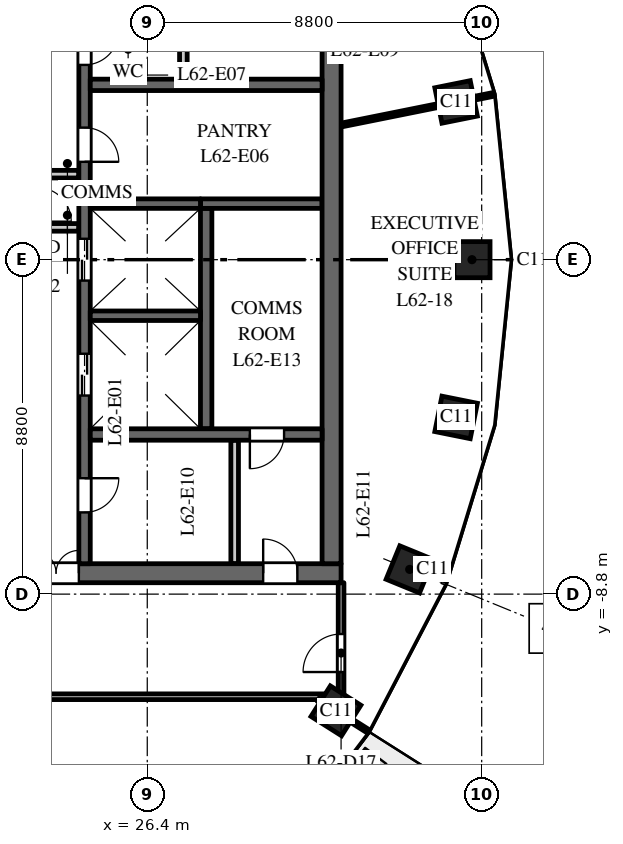
"""IFC4 building model, lengths in metres.
Left out: names, types, materials, properties, quantities, classifications, styles, units other than length and angle.
Written with IfcOpenShell. Run it as: python <this file> out.ifc"""

import sys

from ifc_helpers import new_model, si_unit, direction, frame, frame_2d, origin, origin_2d, place, context, subcontext, project, spatial, rectangle, extrude, element, fill, save


model = new_model("IFC4")
c1 = context("Model", 3, precision=1e-05, world=origin(), true_north=direction((0.0, 1.0)))
c2 = subcontext(c1, "Body", "Model", "MODEL_VIEW")
j1 = project(units=[si_unit("LENGTHUNIT", "METRE"), si_unit("PLANEANGLEUNIT", "RADIAN")], contexts=[c1])
p1 = place(None, origin())
s1 = spatial("IfcSite", under=j1, at=p1, CompositionType="ELEMENT")
p2 = place(p1, origin())
s2 = spatial("IfcBuilding", under=s1, at=p2, CompositionType="ELEMENT")
p3 = place(p2, frame((0.0, 0.0, 291.0)))
s3 = spatial("IfcBuildingStorey", under=s2, at=p3, CompositionType="ELEMENT", Elevation=291.0)
for number, where, z_axis, x_axis in (
    (1, (34.945, 0.0, 0.0), (0.0, 0.0, 1.0), (0.0, 1.0, 0.0)),
    (2, (34.527, 4.151, 0.0), (0.0, 0.0, 1.0), (-0.197, 0.98, 0.0)),
    (3, (31.365, -11.871, 0.0), (0.0, 0.0, 1.0), (0.535, 0.845, 0.0)),
    (4, (33.305, -8.149, 0.0), (0.0, 0.0, 1.0), (0.379, 0.925, 0.0)),
    (5, (34.527, -4.151, 0.0), (0.0, 0.0, 1.0), (0.197, 0.98, 0.0)),
):
    element("IfcColumn", number, at=place(p3, frame(where, z_axis=z_axis, x_axis=x_axis)), inside=s3, PredefinedType="COLUMN", context=c2, shape_type="SweptSolid", body=[
        extrude(rectangle(XDim=0.95, YDim=0.95, at=origin_2d()), origin(), (0.0, 0.0, 1.0), 4.0),
    ])
p4 = place(p3, frame((16.5, -8.25, 0.0), z_axis=(0.0, 0.0, 1.0), x_axis=(1.0, 0.0, 0.0)))
e6 = element("IfcWall", 6, at=p4, inside=s3, PredefinedType="SHEAR", context=c2, shape_type="SweptSolid", body=[
    extrude(rectangle(XDim=15.0, YDim=0.5, at=frame_2d((7.5, 0.0))), origin(), (0.0, 0.0, 1.0), 3.7),
])
p5 = place(p4, frame((6.9, 0.0, 0.0)))
e7 = element("IfcOpeningElement", 7, at=p5, cuts=e6, PredefinedType="OPENING", context=c2, shape_type="SweptSolid", body=[
    extrude(rectangle(XDim=1.2, YDim=2.1, at=frame_2d((0.6, 1.05))), frame((0.0, 0.26, 0.0), z_axis=(0.0, -1.0, 0.0), x_axis=(1.0, 0.0, 0.0)), (0.0, 0.0, 1.0), 0.52),
])
p6 = place(p4, frame((12.95, 0.0, 0.0)))
e8 = element("IfcOpeningElement", 8, at=p6, cuts=e6, PredefinedType="OPENING", context=c2, shape_type="SweptSolid", body=[
    extrude(rectangle(XDim=0.9, YDim=2.1, at=frame_2d((0.45, 1.05))), frame((0.0, 0.26, 0.0), z_axis=(0.0, -1.0, 0.0), x_axis=(1.0, 0.0, 0.0)), (0.0, 0.0, 1.0), 0.52),
])
p7 = place(p3, frame((27.95, -4.45, 0.0), z_axis=(0.0, 0.0, 1.0), x_axis=(0.0, 1.0, 0.0)))
e9 = element("IfcWall", 9, at=p7, inside=s3, PredefinedType="SHEAR", context=c2, shape_type="SweptSolid", body=[
    extrude(rectangle(XDim=5.8, YDim=0.3, at=frame_2d((2.9, 0.0))), origin(), (0.0, 0.0, 1.0), 3.7),
])
p8 = place(p3, frame((27.8, 1.475, 0.0), z_axis=(0.0, 0.0, 1.0), x_axis=(1.0, 0.0, 0.0)))
e10 = element("IfcWall", 10, at=p8, inside=s3, PredefinedType="SHEAR", context=c2, shape_type="SweptSolid", body=[
    extrude(rectangle(XDim=3.2, YDim=0.25, at=frame_2d((1.6, 0.0))), origin(), (0.0, 0.0, 1.0), 3.7),
])
p9 = place(p3, frame((24.75, -8.0, 0.0), z_axis=(0.0, 0.0, 1.0), x_axis=(0.0, 1.0, 0.0)))
e11 = element("IfcWall", 11, at=p9, inside=s3, PredefinedType="SHEAR", context=c2, shape_type="SweptSolid", body=[
    extrude(rectangle(XDim=16.0, YDim=0.3, at=frame_2d((8.0, 0.0))), origin(), (0.0, 0.0, 1.0), 3.7),
])
p10 = place(p9, frame((4.425, 0.0, 0.0)))
e12 = element("IfcOpeningElement", 12, at=p10, cuts=e11, PredefinedType="OPENING", context=c2, shape_type="SweptSolid", body=[
    extrude(rectangle(XDim=1.1, YDim=2.1, at=frame_2d((0.55, 1.05))), frame((0.0, 0.16, 0.0), z_axis=(0.0, -1.0, 0.0), x_axis=(1.0, 0.0, 0.0)), (0.0, 0.0, 1.0), 0.32),
])
p11 = place(p9, frame((7.45, 0.0, 0.0)))
e13 = element("IfcOpeningElement", 13, at=p11, cuts=e11, PredefinedType="OPENING", context=c2, shape_type="SweptSolid", body=[
    extrude(rectangle(XDim=1.1, YDim=2.1, at=frame_2d((0.55, 1.05))), frame((0.0, 0.16, 0.0), z_axis=(0.0, -1.0, 0.0), x_axis=(1.0, 0.0, 0.0)), (0.0, 0.0, 1.0), 0.32),
])
p12 = place(p9, frame((10.575, 0.0, 0.0)))
e14 = element("IfcOpeningElement", 14, at=p12, cuts=e11, PredefinedType="OPENING", context=c2, shape_type="SweptSolid", body=[
    extrude(rectangle(XDim=0.9, YDim=2.1, at=frame_2d((0.45, 1.05))), frame((0.0, 0.16, 0.0), z_axis=(0.0, -1.0, 0.0), x_axis=(1.0, 0.0, 0.0)), (0.0, 0.0, 1.0), 0.32),
])
p13 = place(p9, frame((13.125, 0.0, 0.0)))
e15 = element("IfcOpeningElement", 15, at=p13, cuts=e11, PredefinedType="OPENING", context=c2, shape_type="SweptSolid", body=[
    extrude(rectangle(XDim=0.9, YDim=2.1, at=frame_2d((0.45, 1.05))), frame((0.0, 0.16, 0.0), z_axis=(0.0, -1.0, 0.0), x_axis=(1.0, 0.0, 0.0)), (0.0, 0.0, 1.0), 0.32),
])
p14 = place(p9, frame((14.75, 0.0, 0.0)))
e16 = element("IfcOpeningElement", 16, at=p14, cuts=e11, PredefinedType="OPENING", context=c2, shape_type="SweptSolid", body=[
    extrude(rectangle(XDim=0.9, YDim=2.1, at=frame_2d((0.45, 1.05))), frame((0.0, 0.16, 0.0), z_axis=(0.0, -1.0, 0.0), x_axis=(1.0, 0.0, 0.0)), (0.0, 0.0, 1.0), 0.32),
])
p15 = place(p9, frame((1.35, 0.0, 0.0)))
e17 = element("IfcOpeningElement", 17, at=p15, cuts=e11, PredefinedType="OPENING", context=c2, shape_type="SweptSolid", body=[
    extrude(rectangle(XDim=0.9, YDim=2.1, at=frame_2d((0.45, 1.05))), frame((0.0, 0.16, 0.0), z_axis=(0.0, -1.0, 0.0), x_axis=(1.0, 0.0, 0.0)), (0.0, 0.0, 1.0), 0.32),
])
for number, where, z_axis, x_axis in (
    (18, (23.4, 0.85, 0.0), (0.0, 0.0, 1.0), (1.0, 0.0, 0.0)),
    (19, (23.4, 2.25, 0.0), (0.0, 0.0, 1.0), (1.0, 0.0, 0.0)),
):
    element("IfcWall", number, at=place(p3, frame(where, z_axis=z_axis, x_axis=x_axis)), inside=s3, PredefinedType="PARTITIONING", context=c2, shape_type="SweptSolid", body=[
        extrude(rectangle(XDim=1.2, YDim=0.2, at=frame_2d((0.6, 0.0))), origin(), (0.0, 0.0, 1.0), 3.7),
    ])
p16 = place(p3, frame((31.25, -8.0, 0.0), z_axis=(0.0, 0.0, 1.0), x_axis=(0.0, 1.0, 0.0)))
e20 = element("IfcWall", 20, at=p16, inside=s3, PredefinedType="SHEAR", context=c2, shape_type="SweptSolid", body=[
    extrude(rectangle(XDim=16.0, YDim=0.5, at=frame_2d((8.0, 0.0))), origin(), (0.0, 0.0, 1.0), 3.7),
])
p17 = place(p3, frame((24.9, 4.6, 0.0), z_axis=(0.0, 0.0, 1.0), x_axis=(1.0, 0.0, 0.0)))
e21 = element("IfcWall", 21, at=p17, inside=s3, PredefinedType="SHEAR", context=c2, shape_type="SweptSolid", body=[
    extrude(rectangle(XDim=6.1, YDim=0.3, at=frame_2d((3.05, 0.0))), origin(), (0.0, 0.0, 1.0), 3.7),
])
for number, where, z_axis, x_axis in (
    (22, (27.35, 4.75, 0.0), (0.0, 0.0, 1.0), (0.0, 1.0, 0.0)),
    (23, (28.7, -8.0, 0.0), (0.0, 0.0, 1.0), (0.0, 1.0, 0.0)),
):
    element("IfcWall", number, at=place(p3, frame(where, z_axis=z_axis, x_axis=x_axis)), inside=s3, PredefinedType="PARTITIONING", context=c2, shape_type="SweptSolid", body=[
        extrude(rectangle(XDim=3.25, YDim=0.2, at=frame_2d((1.625, 0.0))), origin(), (0.0, 0.0, 1.0), 3.7),
    ])
p18 = place(p3, frame((24.9, -4.6, 0.0), z_axis=(0.0, 0.0, 1.0), x_axis=(1.0, 0.0, 0.0)))
e24 = element("IfcWall", 24, at=p18, inside=s3, PredefinedType="SHEAR", context=c2, shape_type="SweptSolid", body=[
    extrude(rectangle(XDim=6.1, YDim=0.3, at=frame_2d((3.05, 0.0))), origin(), (0.0, 0.0, 1.0), 3.7),
])
p19 = place(p18, frame((4.2, 0.0, 0.0)))
e25 = element("IfcOpeningElement", 25, at=p19, cuts=e24, PredefinedType="OPENING", context=c2, shape_type="SweptSolid", body=[
    extrude(rectangle(XDim=0.9, YDim=2.1, at=frame_2d((0.45, 1.05))), frame((0.0, 0.16, 0.0), z_axis=(0.0, -1.0, 0.0), x_axis=(1.0, 0.0, 0.0)), (0.0, 0.0, 1.0), 0.32),
])
for number, where, z_axis, x_axis in (
    (26, (24.9, -1.475, 0.0), (0.0, 0.0, 1.0), (1.0, 0.0, 0.0)),
    (27, (24.9, 1.475, 0.0), (0.0, 0.0, 1.0), (1.0, 0.0, 0.0)),
):
    element("IfcWall", number, at=place(p3, frame(where, z_axis=z_axis, x_axis=x_axis)), inside=s3, PredefinedType="SHEAR", context=c2, shape_type="SweptSolid", body=[
        extrude(rectangle(XDim=2.9, YDim=0.25, at=frame_2d((1.45, 0.0))), origin(), (0.0, 0.0, 1.0), 3.7),
    ])
p20 = place(p3, frame((7.129, -11.5, 0.0), z_axis=(0.0, 0.0, 1.0), x_axis=(1.0, 0.0, 0.0)))
e28 = element("IfcWall", 28, at=p20, inside=s3, PredefinedType="PARTITIONING", context=c2, shape_type="SweptSolid", body=[
    extrude(rectangle(XDim=24.371, YDim=0.15, at=frame_2d((12.186, 0.0))), origin(), (0.0, 0.0, 1.0), 2.75),
])
p21 = place(p20, frame((0.633, 0.0, 0.0)))
e29 = element("IfcOpeningElement", 29, at=p21, cuts=e28, PredefinedType="OPENING", context=c2, shape_type="SweptSolid", body=[
    extrude(rectangle(XDim=1.0, YDim=2.1, at=frame_2d((0.5, 1.05))), frame((0.0, 0.085, 0.0), z_axis=(0.0, -1.0, 0.0), x_axis=(1.0, 0.0, 0.0)), (0.0, 0.0, 1.0), 0.17),
])
p22 = place(p20, frame((10.195, 0.0, 0.0)))
e30 = element("IfcOpeningElement", 30, at=p22, cuts=e28, PredefinedType="OPENING", context=c2, shape_type="SweptSolid", body=[
    extrude(rectangle(XDim=1.0, YDim=2.1, at=frame_2d((0.5, 1.05))), frame((0.0, 0.085, 0.0), z_axis=(0.0, -1.0, 0.0), x_axis=(1.0, 0.0, 0.0)), (0.0, 0.0, 1.0), 0.17),
])
p23 = place(p3, frame((30.897, -11.575, 0.0), z_axis=(0.0, 0.0, 1.0), x_axis=(0.844757626245, -0.535149094086, 0.0)))
e31 = element("IfcWall", 31, at=p23, inside=s3, PredefinedType="PARTITIONING", context=c2, shape_type="SweptSolid", body=[
    extrude(rectangle(XDim=1.557, YDim=0.1, at=frame_2d((0.778, 0.0))), origin(), (0.0, 0.0, 1.0), 3.0),
])
p24 = place(p3, frame((31.5, -11.5, 0.0), z_axis=(0.0, 0.0, 1.0), x_axis=(0.0, 1.0, 0.0)))
e32 = element("IfcWall", 32, at=p24, inside=s3, PredefinedType="PARTITIONING", context=c2, shape_type="SweptSolid", body=[
    extrude(rectangle(XDim=3.0, YDim=0.15, at=frame_2d((1.5, 0.0))), origin(), (0.0, 0.0, 1.0), 3.0),
])
p25 = place(p24, frame((0.65, 0.0, 0.0)))
e33 = element("IfcOpeningElement", 33, at=p25, cuts=e32, PredefinedType="OPENING", context=c2, shape_type="SweptSolid", body=[
    extrude(rectangle(XDim=1.0, YDim=2.1, at=frame_2d((0.5, 1.05))), frame((0.0, 0.085, 0.0), z_axis=(0.0, -1.0, 0.0), x_axis=(1.0, 0.0, 0.0)), (0.0, 0.0, 1.0), 0.17),
])
p26 = place(p3, frame((31.5, 3.542, 0.0), z_axis=(0.0, 0.0, 1.0), x_axis=(0.980357474535, 0.197228857227, 0.0)))
e34 = element("IfcWall", 34, at=p26, inside=s3, PredefinedType="PARTITIONING", context=c2, shape_type="SweptSolid", body=[
    extrude(rectangle(XDim=4.092, YDim=0.1, at=frame_2d((2.046, 0.0))), origin(), (0.0, 0.0, 1.0), 3.0),
])
p27 = place(p10, origin())
e35 = element("IfcDoor", 35, at=p27, inside=s3, OperationType="DOUBLE_DOOR_SLIDING", PredefinedType="DOOR", context=c2, shape_type="SweptSolid", body=[
    extrude(rectangle(XDim=1.1, YDim=2.1, at=frame_2d((0.55, 1.05))), frame((0.0, 0.025, 0.0), z_axis=(0.0, -1.0, 0.0), x_axis=(1.0, 0.0, 0.0)), (0.0, 0.0, 1.0), 0.05),
])
fill(e12, e35)
p28 = place(p11, origin())
e36 = element("IfcDoor", 36, at=p28, inside=s3, OperationType="DOUBLE_DOOR_SLIDING", PredefinedType="DOOR", context=c2, shape_type="SweptSolid", body=[
    extrude(rectangle(XDim=1.1, YDim=2.1, at=frame_2d((0.55, 1.05))), frame((0.0, 0.025, 0.0), z_axis=(0.0, -1.0, 0.0), x_axis=(1.0, 0.0, 0.0)), (0.0, 0.0, 1.0), 0.05),
])
fill(e13, e36)
p29 = place(p5, origin())
e37 = element("IfcDoor", 37, at=p29, inside=s3, OperationType="DOUBLE_DOOR_DOUBLE_SWING", PredefinedType="DOOR", context=c2, shape_type="SweptSolid", body=[
    extrude(rectangle(XDim=1.2, YDim=2.1, at=frame_2d((0.6, 1.05))), frame((0.0, 0.025, 0.0), z_axis=(0.0, -1.0, 0.0), x_axis=(1.0, 0.0, 0.0)), (0.0, 0.0, 1.0), 0.05),
])
fill(e7, e37)
p30 = place(p12, origin())
e38 = element("IfcDoor", 38, at=p30, inside=s3, OperationType="SINGLE_SWING_LEFT", PredefinedType="DOOR", context=c2, shape_type="SweptSolid", body=[
    extrude(rectangle(XDim=0.9, YDim=2.1, at=frame_2d((0.45, 1.05))), frame((0.0, 0.025, 0.0), z_axis=(0.0, -1.0, 0.0), x_axis=(1.0, 0.0, 0.0)), (0.0, 0.0, 1.0), 0.05),
])
fill(e14, e38)
p31 = place(p13, origin())
e39 = element("IfcDoor", 39, at=p31, inside=s3, OperationType="SINGLE_SWING_RIGHT", PredefinedType="DOOR", context=c2, shape_type="SweptSolid", body=[
    extrude(rectangle(XDim=0.9, YDim=2.1, at=frame_2d((0.45, 1.05))), frame((0.0, 0.025, 0.0), z_axis=(0.0, -1.0, 0.0), x_axis=(1.0, 0.0, 0.0)), (0.0, 0.0, 1.0), 0.05),
])
fill(e15, e39)
p32 = place(p15, origin())
e40 = element("IfcDoor", 40, at=p32, inside=s3, OperationType="SINGLE_SWING_RIGHT", PredefinedType="DOOR", context=c2, shape_type="SweptSolid", body=[
    extrude(rectangle(XDim=0.9, YDim=2.1, at=frame_2d((0.45, 1.05))), frame((0.0, 0.025, 0.0), z_axis=(0.0, -1.0, 0.0), x_axis=(1.0, 0.0, 0.0)), (0.0, 0.0, 1.0), 0.05),
])
fill(e17, e40)
p33 = place(p6, origin())
e41 = element("IfcDoor", 41, at=p33, inside=s3, OperationType="SINGLE_SWING_RIGHT", PredefinedType="DOOR", context=c2, shape_type="SweptSolid", body=[
    extrude(rectangle(XDim=0.9, YDim=2.1, at=frame_2d((0.45, 1.05))), frame((0.0, 0.025, 0.0), z_axis=(0.0, -1.0, 0.0), x_axis=(1.0, 0.0, 0.0)), (0.0, 0.0, 1.0), 0.05),
])
fill(e8, e41)
p34 = place(p19, origin())
e42 = element("IfcDoor", 42, at=p34, inside=s3, OperationType="SINGLE_SWING_LEFT", PredefinedType="DOOR", context=c2, shape_type="SweptSolid", body=[
    extrude(rectangle(XDim=0.9, YDim=2.1, at=frame_2d((0.45, 1.05))), frame((0.0, 0.025, 0.0), z_axis=(0.0, -1.0, 0.0), x_axis=(1.0, 0.0, 0.0)), (0.0, 0.0, 1.0), 0.05),
])
fill(e25, e42)
p35 = place(p25, origin())
e43 = element("IfcDoor", 43, at=p35, inside=s3, OperationType="SINGLE_SWING_LEFT", PredefinedType="DOOR", context=c2, shape_type="SweptSolid", body=[
    extrude(rectangle(XDim=1.0, YDim=2.1, at=frame_2d((0.5, 1.05))), frame((0.0, 0.025, 0.0), z_axis=(0.0, -1.0, 0.0), x_axis=(1.0, 0.0, 0.0)), (0.0, 0.0, 1.0), 0.05),
])
fill(e33, e43)
save(model, sys.argv[1])
